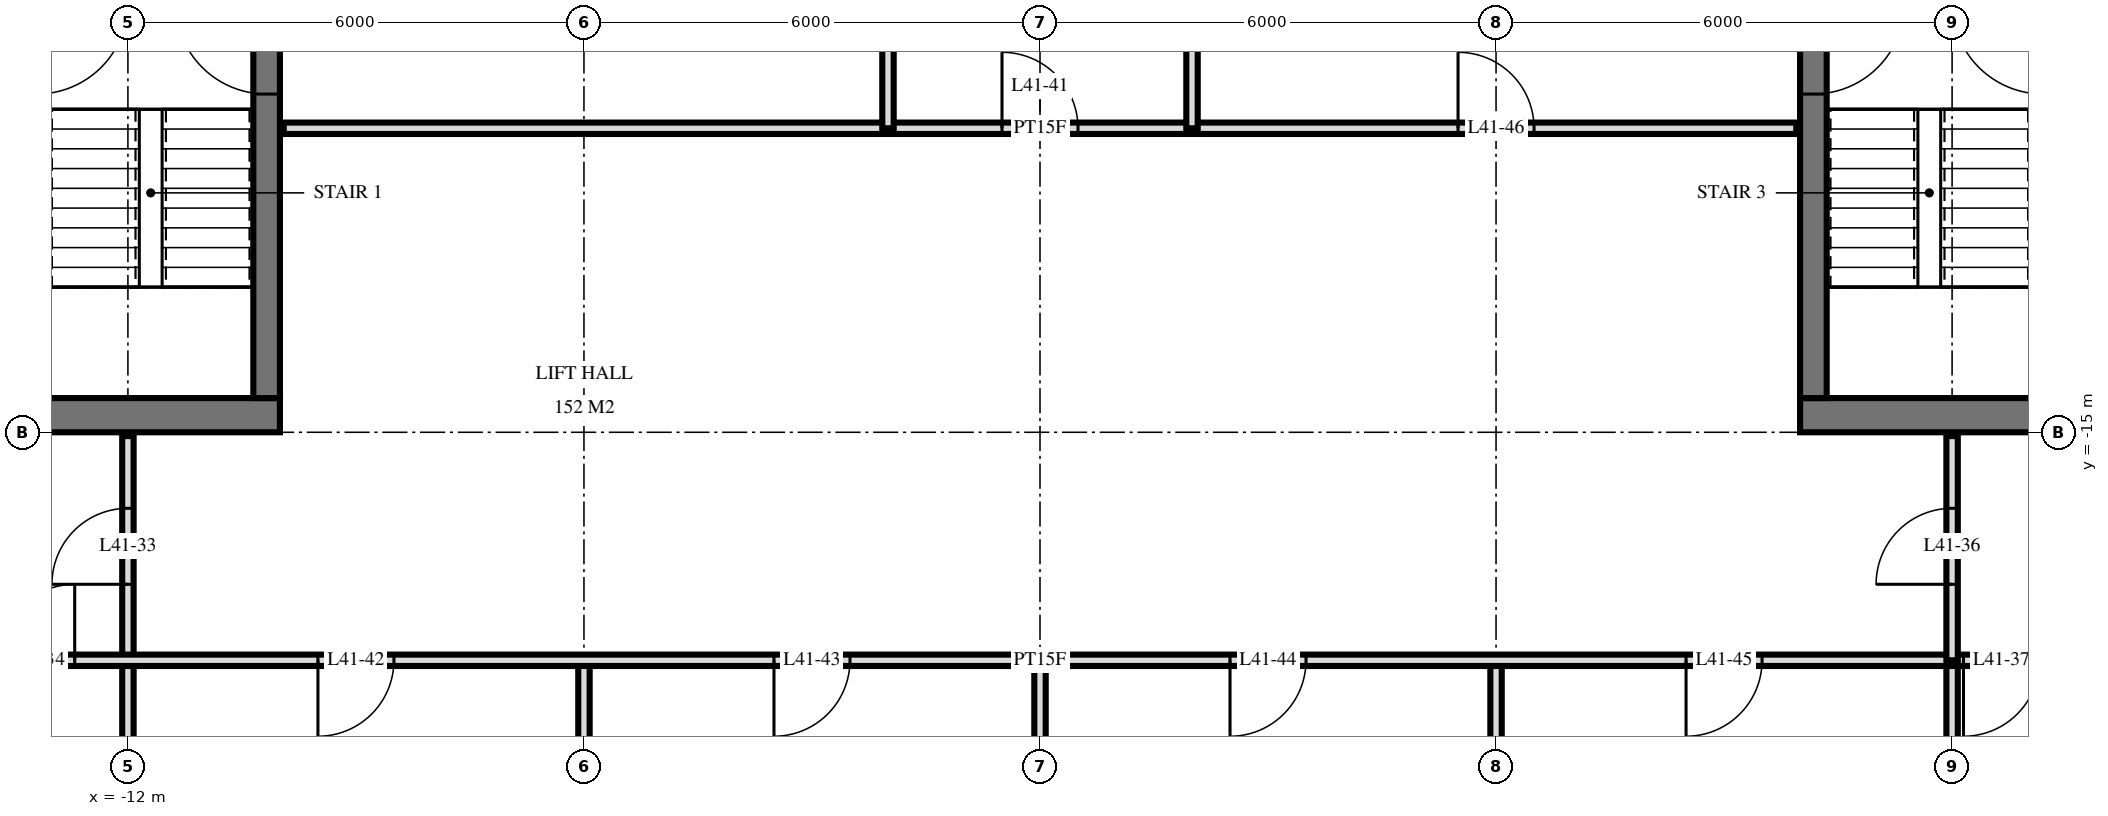
"""IFC4 building model, lengths in metres.
Left out: names, types, materials, properties, quantities, classifications, styles, units other than length and angle.
Written with IfcOpenShell. Run it as: python <this file> out.ifc"""

import sys

from ifc_helpers import new_model, si_unit, direction, frame, frame_2d, origin, place, context, subcontext, project, spatial, rectangle, extrude, element, fill, save


model = new_model("IFC4")
c1 = context("Model", 3, precision=1e-05, world=origin(), true_north=direction((0.0, 1.0)))
c2 = subcontext(c1, "Body", "Model", "MODEL_VIEW")
j1 = project(units=[si_unit("LENGTHUNIT", "METRE"), si_unit("PLANEANGLEUNIT", "RADIAN")], contexts=[c1])
p1 = place(None, origin())
s1 = spatial("IfcSite", under=j1, at=p1, CompositionType="ELEMENT")
p2 = place(p1, origin())
s2 = spatial("IfcBuilding", under=s1, at=p2, CompositionType="ELEMENT")
p3 = place(p2, frame((0.0, 0.0, 159.6)))
s3 = spatial("IfcBuildingStorey", under=s2, at=p3, CompositionType="ELEMENT", Elevation=159.6)
p4 = place(p3, frame((-24.5, -14.775, 0.0), z_axis=(0.0, 0.0, 1.0), x_axis=(1.0, 0.0, 0.0)))
e1 = element("IfcWall", 1, at=p4, inside=s3, PredefinedType="SHEAR", context=c2, shape_type="SweptSolid", body=[
    extrude(rectangle(XDim=14.5, YDim=0.45, at=frame_2d((7.25, 0.0))), origin(), (0.0, 0.0, 1.0), 3.6),
])
p5 = place(p4, frame((6.2, 0.0, 0.0)))
e2 = element("IfcOpeningElement", 2, at=p5, cuts=e1, PredefinedType="OPENING", context=c2, shape_type="SweptSolid", body=[
    extrude(rectangle(XDim=1.2, YDim=2.1, at=frame_2d((0.6, 1.05))), frame((0.0, 0.235, 0.0), z_axis=(0.0, -1.0, 0.0), x_axis=(1.0, 0.0, 0.0)), (0.0, 0.0, 1.0), 0.47),
])
p6 = place(p4, frame((9.25, 0.0, 0.0)))
e3 = element("IfcOpeningElement", 3, at=p6, cuts=e1, PredefinedType="OPENING", context=c2, shape_type="SweptSolid", body=[
    extrude(rectangle(XDim=1.1, YDim=2.1, at=frame_2d((0.55, 1.05))), frame((0.0, 0.235, 0.0), z_axis=(0.0, -1.0, 0.0), x_axis=(1.0, 0.0, 0.0)), (0.0, 0.0, 1.0), 0.47),
])
p7 = place(p4, frame((3.5, 0.0, 0.0)))
e4 = element("IfcOpeningElement", 4, at=p7, cuts=e1, PredefinedType="OPENING", context=c2, shape_type="SweptSolid", body=[
    extrude(rectangle(XDim=0.9, YDim=2.1, at=frame_2d((0.45, 1.05))), frame((0.0, 0.235, 0.0), z_axis=(0.0, -1.0, 0.0), x_axis=(1.0, 0.0, 0.0)), (0.0, 0.0, 1.0), 0.47),
])
p8 = place(p4, frame((1.05, 0.0, 0.0)))
e5 = element("IfcOpeningElement", 5, at=p8, cuts=e1, PredefinedType="OPENING", context=c2, shape_type="SweptSolid", body=[
    extrude(rectangle(XDim=1.0, YDim=2.1, at=frame_2d((0.5, 1.05))), frame((0.0, 0.235, 0.0), z_axis=(0.0, -1.0, 0.0), x_axis=(1.0, 0.0, 0.0)), (0.0, 0.0, 1.0), 0.47),
])
p9 = place(p3, frame((-10.175, -14.55, 0.0), z_axis=(0.0, 0.0, 1.0), x_axis=(0.0, 1.0, 0.0)))
e6 = element("IfcWall", 6, at=p9, inside=s3, PredefinedType="SHEAR", context=c2, shape_type="SweptSolid", body=[
    extrude(rectangle(XDim=14.1, YDim=0.35, at=frame_2d((7.05, 0.0))), origin(), (0.0, 0.0, 1.0), 3.6),
])
p10 = place(p9, frame((8.4, 0.0, 0.0)))
e7 = element("IfcOpeningElement", 7, at=p10, cuts=e6, PredefinedType="OPENING", context=c2, shape_type="SweptSolid", body=[
    extrude(rectangle(XDim=1.4, YDim=2.4, at=frame_2d((0.7, 1.2))), frame((0.0, 0.185, 0.0), z_axis=(0.0, -1.0, 0.0), x_axis=(1.0, 0.0, 0.0)), (0.0, 0.0, 1.0), 0.37),
])
p11 = place(p9, frame((10.0, 0.0, 0.0)))
e8 = element("IfcOpeningElement", 8, at=p11, cuts=e6, PredefinedType="OPENING", context=c2, shape_type="SweptSolid", body=[
    extrude(rectangle(XDim=1.4, YDim=2.4, at=frame_2d((0.7, 1.2))), frame((0.0, 0.185, 0.0), z_axis=(0.0, -1.0, 0.0), x_axis=(1.0, 0.0, 0.0)), (0.0, 0.0, 1.0), 0.37),
])
p12 = place(p9, frame((4.0, 0.0, 0.0)))
e9 = element("IfcOpeningElement", 9, at=p12, cuts=e6, PredefinedType="OPENING", context=c2, shape_type="SweptSolid", body=[
    extrude(rectangle(XDim=1.2, YDim=2.1, at=frame_2d((0.6, 1.05))), frame((0.0, 0.185, 0.0), z_axis=(0.0, -1.0, 0.0), x_axis=(1.0, 0.0, 0.0)), (0.0, 0.0, 1.0), 0.37),
])
p13 = place(p3, frame((10.0, -14.775, 0.0), z_axis=(0.0, 0.0, 1.0), x_axis=(1.0, 0.0, 0.0)))
e10 = element("IfcWall", 10, at=p13, inside=s3, PredefinedType="SHEAR", context=c2, shape_type="SweptSolid", body=[
    extrude(rectangle(XDim=14.5, YDim=0.45, at=frame_2d((7.25, 0.0))), origin(), (0.0, 0.0, 1.0), 3.6),
])
p14 = place(p13, frame((7.1, 0.0, 0.0)))
e11 = element("IfcOpeningElement", 11, at=p14, cuts=e10, PredefinedType="OPENING", context=c2, shape_type="SweptSolid", body=[
    extrude(rectangle(XDim=1.2, YDim=2.1, at=frame_2d((0.6, 1.05))), frame((0.0, 0.235, 0.0), z_axis=(0.0, -1.0, 0.0), x_axis=(1.0, 0.0, 0.0)), (0.0, 0.0, 1.0), 0.47),
])
p15 = place(p13, frame((4.15, 0.0, 0.0)))
e12 = element("IfcOpeningElement", 12, at=p15, cuts=e10, PredefinedType="OPENING", context=c2, shape_type="SweptSolid", body=[
    extrude(rectangle(XDim=1.1, YDim=2.1, at=frame_2d((0.55, 1.05))), frame((0.0, 0.235, 0.0), z_axis=(0.0, -1.0, 0.0), x_axis=(1.0, 0.0, 0.0)), (0.0, 0.0, 1.0), 0.47),
])
p16 = place(p13, frame((10.1, 0.0, 0.0)))
e13 = element("IfcOpeningElement", 13, at=p16, cuts=e10, PredefinedType="OPENING", context=c2, shape_type="SweptSolid", body=[
    extrude(rectangle(XDim=0.9, YDim=2.1, at=frame_2d((0.45, 1.05))), frame((0.0, 0.235, 0.0), z_axis=(0.0, -1.0, 0.0), x_axis=(1.0, 0.0, 0.0)), (0.0, 0.0, 1.0), 0.47),
])
p17 = place(p13, frame((12.45, 0.0, 0.0)))
e14 = element("IfcOpeningElement", 14, at=p17, cuts=e10, PredefinedType="OPENING", context=c2, shape_type="SweptSolid", body=[
    extrude(rectangle(XDim=1.0, YDim=2.1, at=frame_2d((0.5, 1.05))), frame((0.0, 0.235, 0.0), z_axis=(0.0, -1.0, 0.0), x_axis=(1.0, 0.0, 0.0)), (0.0, 0.0, 1.0), 0.47),
])
p18 = place(p3, frame((10.175, -14.55, 0.0), z_axis=(0.0, 0.0, 1.0), x_axis=(0.0, 1.0, 0.0)))
e15 = element("IfcWall", 15, at=p18, inside=s3, PredefinedType="SHEAR", context=c2, shape_type="SweptSolid", body=[
    extrude(rectangle(XDim=14.1, YDim=0.35, at=frame_2d((7.05, 0.0))), origin(), (0.0, 0.0, 1.0), 3.6),
])
p19 = place(p18, frame((8.4, 0.0, 0.0)))
e16 = element("IfcOpeningElement", 16, at=p19, cuts=e15, PredefinedType="OPENING", context=c2, shape_type="SweptSolid", body=[
    extrude(rectangle(XDim=1.4, YDim=2.4, at=frame_2d((0.7, 1.2))), frame((0.0, 0.185, 0.0), z_axis=(0.0, -1.0, 0.0), x_axis=(1.0, 0.0, 0.0)), (0.0, 0.0, 1.0), 0.37),
])
p20 = place(p18, frame((10.0, 0.0, 0.0)))
e17 = element("IfcOpeningElement", 17, at=p20, cuts=e15, PredefinedType="OPENING", context=c2, shape_type="SweptSolid", body=[
    extrude(rectangle(XDim=1.4, YDim=2.4, at=frame_2d((0.7, 1.2))), frame((0.0, 0.185, 0.0), z_axis=(0.0, -1.0, 0.0), x_axis=(1.0, 0.0, 0.0)), (0.0, 0.0, 1.0), 0.37),
])
p21 = place(p18, frame((4.0, 0.0, 0.0)))
e18 = element("IfcOpeningElement", 18, at=p21, cuts=e15, PredefinedType="OPENING", context=c2, shape_type="SweptSolid", body=[
    extrude(rectangle(XDim=1.2, YDim=2.1, at=frame_2d((0.6, 1.05))), frame((0.0, 0.185, 0.0), z_axis=(0.0, -1.0, 0.0), x_axis=(1.0, 0.0, 0.0)), (0.0, 0.0, 1.0), 0.37),
])
p22 = place(p3, frame((12.0, -18.0, 0.0), z_axis=(0.0, 0.0, 1.0), x_axis=(0.0, 1.0, 0.0)))
e19 = element("IfcWall", 19, at=p22, inside=s3, PredefinedType="PARTITIONING", context=c2, shape_type="SweptSolid", body=[
    extrude(rectangle(XDim=2.95, YDim=0.15, at=frame_2d((1.475, 0.0))), origin(), (0.0, 0.0, 1.0), 3.32),
])
p23 = place(p22, frame((1.0, 0.0, 0.0)))
e20 = element("IfcOpeningElement", 20, at=p23, cuts=e19, PredefinedType="OPENING", context=c2, shape_type="SweptSolid", body=[
    extrude(rectangle(XDim=1.0, YDim=2.1, at=frame_2d((0.5, 1.05))), frame((0.0, 0.085, 0.0), z_axis=(0.0, -1.0, 0.0), x_axis=(1.0, 0.0, 0.0)), (0.0, 0.0, 1.0), 0.17),
])
for number, where, z_axis, x_axis in (
    (21, (12.0, -33.62, 0.0), (0.0, 0.0, 1.0), (0.0, 1.0, 0.0)),
    (22, (6.0, -33.62, 0.0), (0.0, 0.0, 1.0), (0.0, 1.0, 0.0)),
):
    element("IfcWall", number, at=place(p3, frame(where, z_axis=z_axis, x_axis=x_axis)), inside=s3, PredefinedType="PARTITIONING", context=c2, shape_type="SweptSolid", body=[
        extrude(rectangle(XDim=15.62, YDim=0.15, at=frame_2d((7.81, 0.0))), origin(), (0.0, 0.0, 1.0), 3.32),
    ])
p24 = place(p3, frame((2.0, -11.0, 0.0), z_axis=(0.0, 0.0, 1.0), x_axis=(0.0, 1.0, 0.0)))
e23 = element("IfcWall", 23, at=p24, inside=s3, PredefinedType="PARTITIONING", context=c2, shape_type="SweptSolid", body=[
    extrude(rectangle(XDim=4.0, YDim=0.15, at=frame_2d((2.0, 0.0))), origin(), (0.0, 0.0, 1.0), 3.32),
])
p25 = place(p3, frame((0.0, -33.62, 0.0), z_axis=(0.0, 0.0, 1.0), x_axis=(0.0, 1.0, 0.0)))
e24 = element("IfcWall", 24, at=p25, inside=s3, PredefinedType="PARTITIONING", context=c2, shape_type="SweptSolid", body=[
    extrude(rectangle(XDim=15.62, YDim=0.15, at=frame_2d((7.81, 0.0))), origin(), (0.0, 0.0, 1.0), 3.32),
])
p26 = place(p3, frame((-2.0, -11.0, 0.0), z_axis=(0.0, 0.0, 1.0), x_axis=(0.0, 1.0, 0.0)))
e25 = element("IfcWall", 25, at=p26, inside=s3, PredefinedType="PARTITIONING", context=c2, shape_type="SweptSolid", body=[
    extrude(rectangle(XDim=4.0, YDim=0.15, at=frame_2d((2.0, 0.0))), origin(), (0.0, 0.0, 1.0), 3.32),
])
p27 = place(p3, frame((-6.0, -33.62, 0.0), z_axis=(0.0, 0.0, 1.0), x_axis=(0.0, 1.0, 0.0)))
e26 = element("IfcWall", 26, at=p27, inside=s3, PredefinedType="PARTITIONING", context=c2, shape_type="SweptSolid", body=[
    extrude(rectangle(XDim=15.62, YDim=0.15, at=frame_2d((7.81, 0.0))), origin(), (0.0, 0.0, 1.0), 3.32),
])
p28 = place(p3, frame((-12.0, -21.0, 0.0), z_axis=(0.0, 0.0, 1.0), x_axis=(0.0, 1.0, 0.0)))
e27 = element("IfcWall", 27, at=p28, inside=s3, PredefinedType="PARTITIONING", context=c2, shape_type="SweptSolid", body=[
    extrude(rectangle(XDim=5.95, YDim=0.15, at=frame_2d((2.975, 0.0))), origin(), (0.0, 0.0, 1.0), 3.32),
])
p29 = place(p28, frame((4.0, 0.0, 0.0)))
e28 = element("IfcOpeningElement", 28, at=p29, cuts=e27, PredefinedType="OPENING", context=c2, shape_type="SweptSolid", body=[
    extrude(rectangle(XDim=1.0, YDim=2.1, at=frame_2d((0.5, 1.05))), frame((0.0, 0.085, 0.0), z_axis=(0.0, -1.0, 0.0), x_axis=(1.0, 0.0, 0.0)), (0.0, 0.0, 1.0), 0.17),
])
p30 = place(p3, frame((-28.02, -18.0, 0.0), z_axis=(0.0, 0.0, 1.0), x_axis=(1.0, 0.0, 0.0)))
e29 = element("IfcWall", 29, at=p30, inside=s3, PredefinedType="PARTITIONING", context=c2, shape_type="SweptSolid", body=[
    extrude(rectangle(XDim=56.04, YDim=0.15, at=frame_2d((28.02, 0.0))), origin(), (0.0, 0.0, 1.0), 3.32),
])
p31 = place(p30, frame((14.32, 0.0, 0.0)))
e30 = element("IfcOpeningElement", 30, at=p31, cuts=e29, PredefinedType="OPENING", context=c2, shape_type="SweptSolid", body=[
    extrude(rectangle(XDim=1.0, YDim=2.1, at=frame_2d((0.5, 1.05))), frame((0.0, 0.085, 0.0), z_axis=(0.0, -1.0, 0.0), x_axis=(1.0, 0.0, 0.0)), (0.0, 0.0, 1.0), 0.17),
])
p32 = place(p30, frame((40.17, 0.0, 0.0)))
e31 = element("IfcOpeningElement", 31, at=p32, cuts=e29, PredefinedType="OPENING", context=c2, shape_type="SweptSolid", body=[
    extrude(rectangle(XDim=1.0, YDim=2.1, at=frame_2d((0.5, 1.05))), frame((0.0, 0.085, 0.0), z_axis=(0.0, -1.0, 0.0), x_axis=(1.0, 0.0, 0.0)), (0.0, 0.0, 1.0), 0.17),
])
p33 = place(p30, frame((44.87, 0.0, 0.0)))
e32 = element("IfcOpeningElement", 32, at=p33, cuts=e29, PredefinedType="OPENING", context=c2, shape_type="SweptSolid", body=[
    extrude(rectangle(XDim=1.0, YDim=2.1, at=frame_2d((0.5, 1.05))), frame((0.0, 0.085, 0.0), z_axis=(0.0, -1.0, 0.0), x_axis=(1.0, 0.0, 0.0)), (0.0, 0.0, 1.0), 0.17),
])
p34 = place(p30, frame((46.72, 0.0, 0.0)))
e33 = element("IfcOpeningElement", 33, at=p34, cuts=e29, PredefinedType="OPENING", context=c2, shape_type="SweptSolid", body=[
    extrude(rectangle(XDim=1.0, YDim=2.1, at=frame_2d((0.5, 1.05))), frame((0.0, 0.085, 0.0), z_axis=(0.0, -1.0, 0.0), x_axis=(1.0, 0.0, 0.0)), (0.0, 0.0, 1.0), 0.17),
])
p35 = place(p30, frame((18.52, 0.0, 0.0)))
e34 = element("IfcOpeningElement", 34, at=p35, cuts=e29, PredefinedType="OPENING", context=c2, shape_type="SweptSolid", body=[
    extrude(rectangle(XDim=1.0, YDim=2.1, at=frame_2d((0.5, 1.05))), frame((0.0, 0.085, 0.0), z_axis=(0.0, -1.0, 0.0), x_axis=(1.0, 0.0, 0.0)), (0.0, 0.0, 1.0), 0.17),
])
p36 = place(p30, frame((24.52, 0.0, 0.0)))
e35 = element("IfcOpeningElement", 35, at=p36, cuts=e29, PredefinedType="OPENING", context=c2, shape_type="SweptSolid", body=[
    extrude(rectangle(XDim=1.0, YDim=2.1, at=frame_2d((0.5, 1.05))), frame((0.0, 0.085, 0.0), z_axis=(0.0, -1.0, 0.0), x_axis=(1.0, 0.0, 0.0)), (0.0, 0.0, 1.0), 0.17),
])
p37 = place(p30, frame((30.52, 0.0, 0.0)))
e36 = element("IfcOpeningElement", 36, at=p37, cuts=e29, PredefinedType="OPENING", context=c2, shape_type="SweptSolid", body=[
    extrude(rectangle(XDim=1.0, YDim=2.1, at=frame_2d((0.5, 1.05))), frame((0.0, 0.085, 0.0), z_axis=(0.0, -1.0, 0.0), x_axis=(1.0, 0.0, 0.0)), (0.0, 0.0, 1.0), 0.17),
])
p38 = place(p30, frame((36.52, 0.0, 0.0)))
e37 = element("IfcOpeningElement", 37, at=p38, cuts=e29, PredefinedType="OPENING", context=c2, shape_type="SweptSolid", body=[
    extrude(rectangle(XDim=1.0, YDim=2.1, at=frame_2d((0.5, 1.05))), frame((0.0, 0.085, 0.0), z_axis=(0.0, -1.0, 0.0), x_axis=(1.0, 0.0, 0.0)), (0.0, 0.0, 1.0), 0.17),
])
p39 = place(p3, frame((-9.95, -11.0, 0.0), z_axis=(0.0, 0.0, 1.0), x_axis=(1.0, 0.0, 0.0)))
e38 = element("IfcWall", 38, at=p39, inside=s3, PredefinedType="PARTITIONING", context=c2, shape_type="SweptSolid", body=[
    extrude(rectangle(XDim=19.9, YDim=0.15, at=frame_2d((9.95, 0.0))), origin(), (0.0, 0.0, 1.0), 3.32),
])
p40 = place(p39, frame((9.45, 0.0, 0.0)))
e39 = element("IfcOpeningElement", 39, at=p40, cuts=e38, PredefinedType="OPENING", context=c2, shape_type="SweptSolid", body=[
    extrude(rectangle(XDim=1.0, YDim=2.1, at=frame_2d((0.5, 1.05))), frame((0.0, 0.085, 0.0), z_axis=(0.0, -1.0, 0.0), x_axis=(1.0, 0.0, 0.0)), (0.0, 0.0, 1.0), 0.17),
])
p41 = place(p39, frame((15.45, 0.0, 0.0)))
e40 = element("IfcOpeningElement", 40, at=p41, cuts=e38, PredefinedType="OPENING", context=c2, shape_type="SweptSolid", body=[
    extrude(rectangle(XDim=1.0, YDim=2.1, at=frame_2d((0.5, 1.05))), frame((0.0, 0.085, 0.0), z_axis=(0.0, -1.0, 0.0), x_axis=(1.0, 0.0, 0.0)), (0.0, 0.0, 1.0), 0.17),
])
p42 = place(p12, origin())
e41 = element("IfcDoor", 41, at=p42, inside=s3, OperationType="SINGLE_SWING_LEFT", PredefinedType="DOOR", context=c2, shape_type="SweptSolid", body=[
    extrude(rectangle(XDim=1.2, YDim=2.1, at=frame_2d((0.6, 1.05))), frame((0.0, 0.025, 0.0), z_axis=(0.0, -1.0, 0.0), x_axis=(1.0, 0.0, 0.0)), (0.0, 0.0, 1.0), 0.05),
])
fill(e9, e41)
p43 = place(p21, frame((0.6, 0.0, 0.0), z_axis=(0.0, 0.0, 1.0), x_axis=(-1.0, 0.0, 0.0)))
e42 = element("IfcDoor", 42, at=p43, inside=s3, OperationType="SINGLE_SWING_RIGHT", PredefinedType="DOOR", context=c2, shape_type="SweptSolid", body=[
    extrude(rectangle(XDim=1.2, YDim=2.1, at=frame_2d((0.0, 1.05))), frame((0.0, -0.025, 0.0), z_axis=(0.0, 1.0, 0.0), x_axis=(-1.0, 0.0, 0.0)), (0.0, 0.0, 1.0), 0.05),
])
fill(e18, e42)
p44 = place(p29, origin())
e43 = element("IfcDoor", 43, at=p44, inside=s3, OperationType="SINGLE_SWING_RIGHT", PredefinedType="DOOR", context=c2, shape_type="SweptSolid", body=[
    extrude(rectangle(XDim=1.0, YDim=2.1, at=frame_2d((0.5, 1.05))), frame((0.0, 0.025, 0.0), z_axis=(0.0, -1.0, 0.0), x_axis=(1.0, 0.0, 0.0)), (0.0, 0.0, 1.0), 0.05),
])
fill(e28, e43)
p45 = place(p31, origin())
e44 = element("IfcDoor", 44, at=p45, inside=s3, OperationType="SINGLE_SWING_LEFT", PredefinedType="DOOR", context=c2, shape_type="SweptSolid", body=[
    extrude(rectangle(XDim=1.0, YDim=2.1, at=frame_2d((0.5, 1.05))), frame((0.0, 0.025, 0.0), z_axis=(0.0, -1.0, 0.0), x_axis=(1.0, 0.0, 0.0)), (0.0, 0.0, 1.0), 0.05),
])
fill(e30, e44)
p46 = place(p23, origin())
e45 = element("IfcDoor", 45, at=p46, inside=s3, OperationType="SINGLE_SWING_RIGHT", PredefinedType="DOOR", context=c2, shape_type="SweptSolid", body=[
    extrude(rectangle(XDim=1.0, YDim=2.1, at=frame_2d((0.5, 1.05))), frame((0.0, 0.025, 0.0), z_axis=(0.0, -1.0, 0.0), x_axis=(1.0, 0.0, 0.0)), (0.0, 0.0, 1.0), 0.05),
])
fill(e20, e45)
p47 = place(p32, frame((0.5, 0.0, 0.0), z_axis=(0.0, 0.0, 1.0), x_axis=(-1.0, 0.0, 0.0)))
e46 = element("IfcDoor", 46, at=p47, inside=s3, OperationType="SINGLE_SWING_LEFT", PredefinedType="DOOR", context=c2, shape_type="SweptSolid", body=[
    extrude(rectangle(XDim=1.0, YDim=2.1, at=frame_2d((0.0, 1.05))), frame((0.0, -0.025, 0.0), z_axis=(0.0, 1.0, 0.0), x_axis=(-1.0, 0.0, 0.0)), (0.0, 0.0, 1.0), 0.05),
])
fill(e31, e46)
p48 = place(p40, origin())
e47 = element("IfcDoor", 47, at=p48, inside=s3, OperationType="SINGLE_SWING_RIGHT", PredefinedType="DOOR", context=c2, shape_type="SweptSolid", body=[
    extrude(rectangle(XDim=1.0, YDim=2.1, at=frame_2d((0.5, 1.05))), frame((0.0, 0.025, 0.0), z_axis=(0.0, -1.0, 0.0), x_axis=(1.0, 0.0, 0.0)), (0.0, 0.0, 1.0), 0.05),
])
fill(e39, e47)
p49 = place(p35, frame((0.5, 0.0, 0.0), z_axis=(0.0, 0.0, 1.0), x_axis=(-1.0, 0.0, 0.0)))
e48 = element("IfcDoor", 48, at=p49, inside=s3, OperationType="SINGLE_SWING_LEFT", PredefinedType="DOOR", context=c2, shape_type="SweptSolid", body=[
    extrude(rectangle(XDim=1.0, YDim=2.1, at=frame_2d((0.0, 1.05))), frame((0.0, -0.025, 0.0), z_axis=(0.0, 1.0, 0.0), x_axis=(-1.0, 0.0, 0.0)), (0.0, 0.0, 1.0), 0.05),
])
fill(e34, e48)
p50 = place(p36, frame((0.5, 0.0, 0.0), z_axis=(0.0, 0.0, 1.0), x_axis=(-1.0, 0.0, 0.0)))
e49 = element("IfcDoor", 49, at=p50, inside=s3, OperationType="SINGLE_SWING_LEFT", PredefinedType="DOOR", context=c2, shape_type="SweptSolid", body=[
    extrude(rectangle(XDim=1.0, YDim=2.1, at=frame_2d((0.0, 1.05))), frame((0.0, -0.025, 0.0), z_axis=(0.0, 1.0, 0.0), x_axis=(-1.0, 0.0, 0.0)), (0.0, 0.0, 1.0), 0.05),
])
fill(e35, e49)
p51 = place(p37, frame((0.5, 0.0, 0.0), z_axis=(0.0, 0.0, 1.0), x_axis=(-1.0, 0.0, 0.0)))
e50 = element("IfcDoor", 50, at=p51, inside=s3, OperationType="SINGLE_SWING_LEFT", PredefinedType="DOOR", context=c2, shape_type="SweptSolid", body=[
    extrude(rectangle(XDim=1.0, YDim=2.1, at=frame_2d((0.0, 1.05))), frame((0.0, -0.025, 0.0), z_axis=(0.0, 1.0, 0.0), x_axis=(-1.0, 0.0, 0.0)), (0.0, 0.0, 1.0), 0.05),
])
fill(e36, e50)
p52 = place(p38, frame((0.5, 0.0, 0.0), z_axis=(0.0, 0.0, 1.0), x_axis=(-1.0, 0.0, 0.0)))
e51 = element("IfcDoor", 51, at=p52, inside=s3, OperationType="SINGLE_SWING_LEFT", PredefinedType="DOOR", context=c2, shape_type="SweptSolid", body=[
    extrude(rectangle(XDim=1.0, YDim=2.1, at=frame_2d((0.0, 1.05))), frame((0.0, -0.025, 0.0), z_axis=(0.0, 1.0, 0.0), x_axis=(-1.0, 0.0, 0.0)), (0.0, 0.0, 1.0), 0.05),
])
fill(e37, e51)
p53 = place(p41, origin())
e52 = element("IfcDoor", 52, at=p53, inside=s3, OperationType="SINGLE_SWING_RIGHT", PredefinedType="DOOR", context=c2, shape_type="SweptSolid", body=[
    extrude(rectangle(XDim=1.0, YDim=2.1, at=frame_2d((0.5, 1.05))), frame((0.0, 0.025, 0.0), z_axis=(0.0, -1.0, 0.0), x_axis=(1.0, 0.0, 0.0)), (0.0, 0.0, 1.0), 0.05),
])
fill(e40, e52)
save(model, sys.argv[1])
